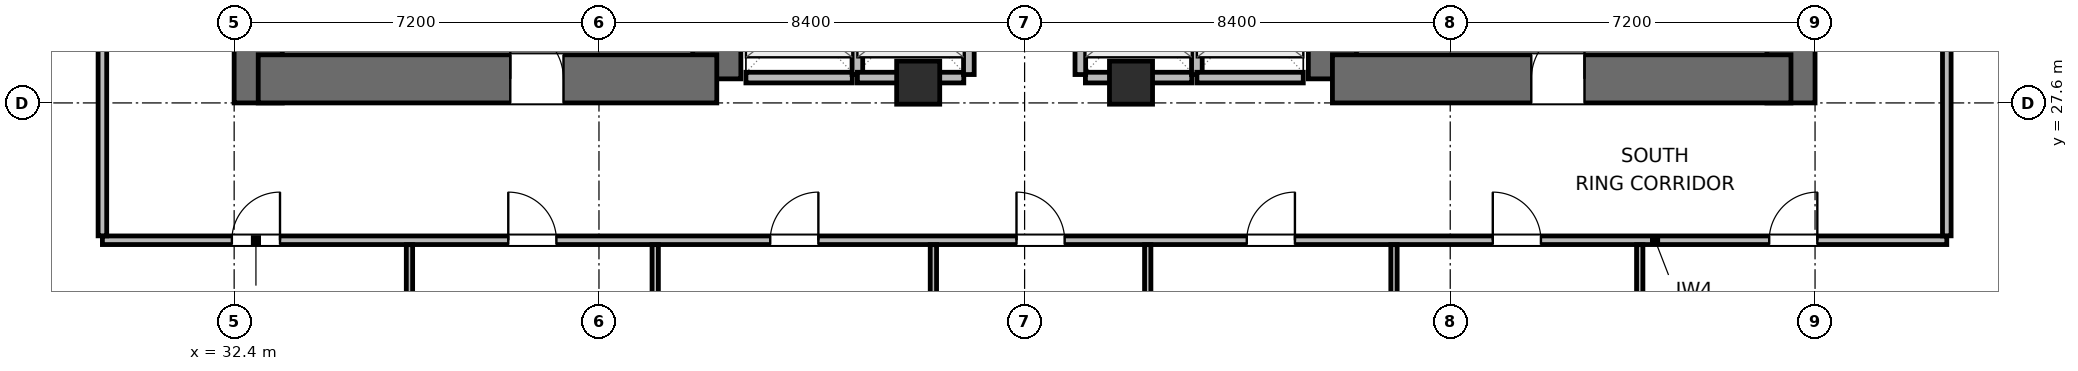
"""IFC4 building model, lengths in metres.
Left out: names, types, materials, properties, quantities, classifications, styles, units other than length and angle.
Written with IfcOpenShell. Run it as: python <this file> out.ifc"""

import sys

from ifc_helpers import new_model, si_unit, direction, frame, frame_2d, origin, origin_2d, place, context, subcontext, project, spatial, rectangle, extrude, element, fill, save


model = new_model("IFC4")
c1 = context("Model", 3, precision=1e-05, world=origin(), true_north=direction((0.0, 1.0)))
c2 = subcontext(c1, "Body", "Model", "MODEL_VIEW")
j1 = project(units=[si_unit("LENGTHUNIT", "METRE"), si_unit("PLANEANGLEUNIT", "RADIAN")], contexts=[c1])
p1 = place(None, origin())
s1 = spatial("IfcSite", under=j1, at=p1, CompositionType="ELEMENT")
p2 = place(p1, origin())
s2 = spatial("IfcBuilding", under=s1, at=p2, CompositionType="ELEMENT")
p3 = place(p2, frame((0.0, 0.0, 48.9)))
s3 = spatial("IfcBuildingStorey", under=s2, at=p3, CompositionType="ELEMENT", Elevation=48.9)
p4 = place(p3, frame((32.875, 27.6, 0.0), z_axis=(0.0, 0.0, 1.0), x_axis=(0.0, 1.0, 0.0)))
e1 = element("IfcWall", 1, at=p4, inside=s3, PredefinedType="SHEAR", context=c2, shape_type="SweptSolid", body=[
    extrude(rectangle(XDim=16.8, YDim=0.95, at=frame_2d((8.4, 0.0))), origin(), (0.0, 0.0, 1.0), 3.9),
])
p5 = place(p3, frame((41.925, 28.075, 0.0), z_axis=(0.0, 0.0, 1.0), x_axis=(0.0, 1.0, 0.0)))
e2 = element("IfcWall", 2, at=p5, inside=s3, PredefinedType="SHEAR", context=c2, shape_type="SweptSolid", body=[
    extrude(rectangle(XDim=6.325, YDim=0.95, at=frame_2d((3.163, 0.0))), origin(), (0.0, 0.0, 1.0), 3.9),
])
p6 = place(p3, frame((32.875, 28.075, 0.0), z_axis=(0.0, 0.0, 1.0), x_axis=(1.0, 0.0, 0.0)))
e3 = element("IfcWall", 3, at=p6, inside=s3, PredefinedType="SHEAR", context=c2, shape_type="SweptSolid", body=[
    extrude(rectangle(XDim=9.05, YDim=0.95, at=frame_2d((4.525, 0.0))), origin(), (0.0, 0.0, 1.0), 3.9),
])
p7 = place(p6, frame((4.975, 0.0, 0.0)))
e4 = element("IfcOpeningElement", 4, at=p7, cuts=e3, PredefinedType="OPENING", context=c2, shape_type="SweptSolid", body=[
    extrude(rectangle(XDim=1.05, YDim=2.04, at=frame_2d((0.525, 1.02))), frame((0.0, 0.485, 0.0), z_axis=(0.0, -1.0, 0.0), x_axis=(1.0, 0.0, 0.0)), (0.0, 0.0, 1.0), 0.97),
])
p8 = place(p3, frame((54.075, 28.075, 0.0), z_axis=(0.0, 0.0, 1.0), x_axis=(0.0, 1.0, 0.0)))
e5 = element("IfcWall", 5, at=p8, inside=s3, PredefinedType="SHEAR", context=c2, shape_type="SweptSolid", body=[
    extrude(rectangle(XDim=7.725, YDim=0.95, at=frame_2d((3.863, 0.0))), origin(), (0.0, 0.0, 1.0), 3.9),
])
p9 = place(p3, frame((63.125, 27.6, 0.0), z_axis=(0.0, 0.0, 1.0), x_axis=(0.0, 1.0, 0.0)))
e6 = element("IfcWall", 6, at=p9, inside=s3, PredefinedType="SHEAR", context=c2, shape_type="SweptSolid", body=[
    extrude(rectangle(XDim=16.8, YDim=0.95, at=frame_2d((8.4, 0.0))), origin(), (0.0, 0.0, 1.0), 3.9),
])
p10 = place(p3, frame((54.075, 28.075, 0.0), z_axis=(0.0, 0.0, 1.0), x_axis=(1.0, 0.0, 0.0)))
e7 = element("IfcWall", 7, at=p10, inside=s3, PredefinedType="SHEAR", context=c2, shape_type="SweptSolid", body=[
    extrude(rectangle(XDim=9.05, YDim=0.95, at=frame_2d((4.525, 0.0))), origin(), (0.0, 0.0, 1.0), 3.9),
])
p11 = place(p10, frame((3.925, 0.0, 0.0)))
e8 = element("IfcOpeningElement", 8, at=p11, cuts=e7, PredefinedType="OPENING", context=c2, shape_type="SweptSolid", body=[
    extrude(rectangle(XDim=1.05, YDim=2.04, at=frame_2d((0.525, 1.02))), frame((0.0, 0.485, 0.0), z_axis=(0.0, -1.0, 0.0), x_axis=(1.0, 0.0, 0.0)), (0.0, 0.0, 1.0), 0.97),
])
for number, where, z_axis, x_axis in (
    (9, (45.9, 28.0, 0.0), (0.0, 0.0, 1.0), (1.0, 0.0, 0.0)),
    (10, (50.1, 28.0, 0.0), (0.0, 0.0, 1.0), (1.0, 0.0, 0.0)),
):
    element("IfcColumn", number, at=place(p3, frame(where, z_axis=z_axis, x_axis=x_axis)), inside=s3, PredefinedType="COLUMN", context=c2, shape_type="SweptSolid", body=[
        extrude(rectangle(XDim=0.85, YDim=0.85, at=origin_2d()), origin(), (0.0, 0.0, 1.0), 3.9),
    ])
p12 = place(p3, frame((42.5, 28.1, 0.0), z_axis=(0.0, 0.0, 1.0), x_axis=(1.0, 0.0, 0.0)))
e11 = element("IfcWall", 11, at=p12, inside=s3, PredefinedType="PARTITIONING", context=c2, shape_type="SweptSolid", body=[
    extrude(rectangle(XDim=2.1, YDim=0.21, at=frame_2d((1.05, 0.0))), origin(), (0.0, 0.0, 1.0), 2.525),
])
p13 = place(p3, frame((44.7, 28.16, 0.0), z_axis=(0.0, 0.0, 1.0), x_axis=(0.0, 1.0, 0.0)))
e12 = element("IfcWall", 12, at=p13, inside=s3, PredefinedType="PARTITIONING", context=c2, shape_type="SweptSolid", body=[
    extrude(rectangle(XDim=2.28, YDim=0.21, at=frame_2d((1.14, 0.0))), origin(), (0.0, 0.0, 1.0), 3.64),
])
p14 = place(p3, frame((44.7, 28.1, 0.0), z_axis=(0.0, 0.0, 1.0), x_axis=(1.0, 0.0, 0.0)))
e13 = element("IfcWall", 13, at=p14, inside=s3, PredefinedType="PARTITIONING", context=c2, shape_type="SweptSolid", body=[
    extrude(rectangle(XDim=2.1, YDim=0.21, at=frame_2d((1.05, 0.0))), origin(), (0.0, 0.0, 1.0), 2.525),
])
p15 = place(p3, frame((46.9, 28.16, 0.0), z_axis=(0.0, 0.0, 1.0), x_axis=(0.0, 1.0, 0.0)))
e14 = element("IfcWall", 14, at=p15, inside=s3, PredefinedType="PARTITIONING", context=c2, shape_type="SweptSolid", body=[
    extrude(rectangle(XDim=2.28, YDim=0.21, at=frame_2d((1.14, 0.0))), origin(), (0.0, 0.0, 1.0), 3.64),
])
p16 = place(p3, frame((49.2, 28.1, 0.0), z_axis=(0.0, 0.0, 1.0), x_axis=(1.0, 0.0, 0.0)))
e15 = element("IfcWall", 15, at=p16, inside=s3, PredefinedType="PARTITIONING", context=c2, shape_type="SweptSolid", body=[
    extrude(rectangle(XDim=2.1, YDim=0.21, at=frame_2d((1.05, 0.0))), origin(), (0.0, 0.0, 1.0), 2.525),
])
for number, where, z_axis, x_axis in (
    (16, (49.1, 28.16, 0.0), (0.0, 0.0, 1.0), (0.0, 1.0, 0.0)),
    (17, (51.4, 28.16, 0.0), (0.0, 0.0, 1.0), (0.0, 1.0, 0.0)),
):
    element("IfcWall", number, at=place(p3, frame(where, z_axis=z_axis, x_axis=x_axis)), inside=s3, PredefinedType="PARTITIONING", context=c2, shape_type="SweptSolid", body=[
        extrude(rectangle(XDim=2.28, YDim=0.21, at=frame_2d((1.14, 0.0))), origin(), (0.0, 0.0, 1.0), 3.64),
    ])
p17 = place(p3, frame((51.4, 28.1, 0.0), z_axis=(0.0, 0.0, 1.0), x_axis=(1.0, 0.0, 0.0)))
e18 = element("IfcWall", 18, at=p17, inside=s3, PredefinedType="PARTITIONING", context=c2, shape_type="SweptSolid", body=[
    extrude(rectangle(XDim=2.1, YDim=0.21, at=frame_2d((1.05, 0.0))), origin(), (0.0, 0.0, 1.0), 2.525),
])
p18 = place(p3, frame((29.8, 24.89, 0.0), z_axis=(0.0, 0.0, 1.0), x_axis=(1.0, 0.0, 0.0)))
e19 = element("IfcWall", 19, at=p18, inside=s3, PredefinedType="PARTITIONING", context=c2, shape_type="SweptSolid", body=[
    extrude(rectangle(XDim=36.4, YDim=0.17, at=frame_2d((18.2, 0.0))), origin(), (0.0, 0.0, 1.0), 3.64),
])
p19 = place(p18, frame((2.555, 0.0, 0.0)))
e20 = element("IfcOpeningElement", 20, at=p19, cuts=e19, PredefinedType="OPENING", context=c2, shape_type="SweptSolid", body=[
    extrude(rectangle(XDim=0.95, YDim=2.04, at=frame_2d((0.475, 1.02))), frame((0.0, 0.095, 0.0), z_axis=(0.0, -1.0, 0.0), x_axis=(1.0, 0.0, 0.0)), (0.0, 0.0, 1.0), 0.19),
])
p20 = place(p18, frame((8.01, 0.0, 0.0)))
e21 = element("IfcOpeningElement", 21, at=p20, cuts=e19, PredefinedType="OPENING", context=c2, shape_type="SweptSolid", body=[
    extrude(rectangle(XDim=0.95, YDim=2.04, at=frame_2d((0.475, 1.02))), frame((0.0, 0.095, 0.0), z_axis=(0.0, -1.0, 0.0), x_axis=(1.0, 0.0, 0.0)), (0.0, 0.0, 1.0), 0.19),
])
p21 = place(p18, frame((13.18, 0.0, 0.0)))
e22 = element("IfcOpeningElement", 22, at=p21, cuts=e19, PredefinedType="OPENING", context=c2, shape_type="SweptSolid", body=[
    extrude(rectangle(XDim=0.95, YDim=2.04, at=frame_2d((0.475, 1.02))), frame((0.0, 0.095, 0.0), z_axis=(0.0, -1.0, 0.0), x_axis=(1.0, 0.0, 0.0)), (0.0, 0.0, 1.0), 0.19),
])
p22 = place(p18, frame((18.04, 0.0, 0.0)))
e23 = element("IfcOpeningElement", 23, at=p22, cuts=e19, PredefinedType="OPENING", context=c2, shape_type="SweptSolid", body=[
    extrude(rectangle(XDim=0.95, YDim=2.04, at=frame_2d((0.475, 1.02))), frame((0.0, 0.095, 0.0), z_axis=(0.0, -1.0, 0.0), x_axis=(1.0, 0.0, 0.0)), (0.0, 0.0, 1.0), 0.19),
])
p23 = place(p18, frame((22.585, 0.0, 0.0)))
e24 = element("IfcOpeningElement", 24, at=p23, cuts=e19, PredefinedType="OPENING", context=c2, shape_type="SweptSolid", body=[
    extrude(rectangle(XDim=0.95, YDim=2.04, at=frame_2d((0.475, 1.02))), frame((0.0, 0.095, 0.0), z_axis=(0.0, -1.0, 0.0), x_axis=(1.0, 0.0, 0.0)), (0.0, 0.0, 1.0), 0.19),
])
p24 = place(p18, frame((27.44, 0.0, 0.0)))
e25 = element("IfcOpeningElement", 25, at=p24, cuts=e19, PredefinedType="OPENING", context=c2, shape_type="SweptSolid", body=[
    extrude(rectangle(XDim=0.95, YDim=2.04, at=frame_2d((0.475, 1.02))), frame((0.0, 0.095, 0.0), z_axis=(0.0, -1.0, 0.0), x_axis=(1.0, 0.0, 0.0)), (0.0, 0.0, 1.0), 0.19),
])
p25 = place(p18, frame((32.895, 0.0, 0.0)))
e26 = element("IfcOpeningElement", 26, at=p25, cuts=e19, PredefinedType="OPENING", context=c2, shape_type="SweptSolid", body=[
    extrude(rectangle(XDim=0.95, YDim=2.04, at=frame_2d((0.475, 1.02))), frame((0.0, 0.095, 0.0), z_axis=(0.0, -1.0, 0.0), x_axis=(1.0, 0.0, 0.0)), (0.0, 0.0, 1.0), 0.19),
])
p26 = place(p3, frame((29.8, 24.977, 0.0), z_axis=(0.0, 0.0, 1.0), x_axis=(0.0, 1.0, 0.0)))
e27 = element("IfcWall", 27, at=p26, inside=s3, PredefinedType="PARTITIONING", context=c2, shape_type="SweptSolid", body=[
    extrude(rectangle(XDim=22.046, YDim=0.17, at=frame_2d((11.023, 0.0))), origin(), (0.0, 0.0, 1.0), 3.64),
])
p27 = place(p26, frame((10.548, 0.0, 0.0)))
e28 = element("IfcOpeningElement", 28, at=p27, cuts=e27, PredefinedType="OPENING", context=c2, shape_type="SweptSolid", body=[
    extrude(rectangle(XDim=0.95, YDim=2.04, at=frame_2d((0.475, 1.02))), frame((0.0, 0.095, 0.0), z_axis=(0.0, -1.0, 0.0), x_axis=(1.0, 0.0, 0.0)), (0.0, 0.0, 1.0), 0.19),
])
p28 = place(p3, frame((66.2, 24.977, 0.0), z_axis=(0.0, 0.0, 1.0), x_axis=(0.0, 1.0, 0.0)))
e29 = element("IfcWall", 29, at=p28, inside=s3, PredefinedType="PARTITIONING", context=c2, shape_type="SweptSolid", body=[
    extrude(rectangle(XDim=22.046, YDim=0.17, at=frame_2d((11.023, 0.0))), origin(), (0.0, 0.0, 1.0), 3.64),
])
p29 = place(p28, frame((4.493, 0.0, 0.0)))
e30 = element("IfcOpeningElement", 30, at=p29, cuts=e29, PredefinedType="OPENING", context=c2, shape_type="SweptSolid", body=[
    extrude(rectangle(XDim=0.95, YDim=2.04, at=frame_2d((0.475, 1.02))), frame((0.0, 0.095, 0.0), z_axis=(0.0, -1.0, 0.0), x_axis=(1.0, 0.0, 0.0)), (0.0, 0.0, 1.0), 0.19),
])
p30 = place(p28, frame((15.603, 0.0, 0.0)))
e31 = element("IfcOpeningElement", 31, at=p30, cuts=e29, PredefinedType="OPENING", context=c2, shape_type="SweptSolid", body=[
    extrude(rectangle(XDim=0.95, YDim=2.04, at=frame_2d((0.475, 1.02))), frame((0.0, 0.095, 0.0), z_axis=(0.0, -1.0, 0.0), x_axis=(1.0, 0.0, 0.0)), (0.0, 0.0, 1.0), 0.19),
])
p31 = place(p3, frame((35.86, 9.915, 0.0), z_axis=(0.0, 0.0, 1.0), x_axis=(0.0, 1.0, 0.0)))
e32 = element("IfcWall", 32, at=p31, inside=s3, PredefinedType="PARTITIONING", context=c2, shape_type="SweptSolid", body=[
    extrude(rectangle(XDim=14.888, YDim=0.125, at=frame_2d((7.444, 0.0))), origin(), (0.0, 0.0, 1.0), 3.64),
])
p32 = place(p3, frame((40.71, 9.915, 0.0), z_axis=(0.0, 0.0, 1.0), x_axis=(0.0, 1.0, 0.0)))
e33 = element("IfcWall", 33, at=p32, inside=s3, PredefinedType="PARTITIONING", context=c2, shape_type="SweptSolid", body=[
    extrude(rectangle(XDim=14.888, YDim=0.125, at=frame_2d((7.444, 0.0))), origin(), (0.0, 0.0, 1.0), 3.003),
])
p33 = place(p3, frame((46.2, 13.575, 0.0), z_axis=(0.0, 0.0, 1.0), x_axis=(0.0, 1.0, 0.0)))
e34 = element("IfcWall", 34, at=p33, inside=s3, PredefinedType="PARTITIONING", context=c2, shape_type="SweptSolid", body=[
    extrude(rectangle(XDim=11.228, YDim=0.125, at=frame_2d((5.614, 0.0))), origin(), (0.0, 0.0, 1.0), 3.64),
])
p34 = place(p3, frame((50.43, 11.515, 0.0), z_axis=(0.0, 0.0, 1.0), x_axis=(0.0, 1.0, 0.0)))
e35 = element("IfcWall", 35, at=p34, inside=s3, PredefinedType="PARTITIONING", context=c2, shape_type="SweptSolid", body=[
    extrude(rectangle(XDim=13.288, YDim=0.125, at=frame_2d((6.644, 0.0))), origin(), (0.0, 0.0, 1.0), 3.64),
])
p35 = place(p3, frame((55.29, 9.915, 0.0), z_axis=(0.0, 0.0, 1.0), x_axis=(0.0, 1.0, 0.0)))
e36 = element("IfcWall", 36, at=p35, inside=s3, PredefinedType="PARTITIONING", context=c2, shape_type="SweptSolid", body=[
    extrude(rectangle(XDim=14.888, YDim=0.125, at=frame_2d((7.444, 0.0))), origin(), (0.0, 0.0, 1.0), 3.003),
])
p36 = place(p3, frame((60.14, 9.915, 0.0), z_axis=(0.0, 0.0, 1.0), x_axis=(0.0, 1.0, 0.0)))
e37 = element("IfcWall", 37, at=p36, inside=s3, PredefinedType="PARTITIONING", context=c2, shape_type="SweptSolid", body=[
    extrude(rectangle(XDim=14.888, YDim=0.125, at=frame_2d((7.444, 0.0))), origin(), (0.0, 0.0, 1.0), 3.64),
])
p37 = place(p7, origin())
e38 = element("IfcDoor", 38, at=p37, inside=s3, OperationType="SINGLE_SWING_LEFT", PredefinedType="DOOR", context=c2, shape_type="SweptSolid", body=[
    extrude(rectangle(XDim=1.05, YDim=2.04, at=frame_2d((0.525, 1.02))), frame((0.0, 0.025, 0.0), z_axis=(0.0, -1.0, 0.0), x_axis=(1.0, 0.0, 0.0)), (0.0, 0.0, 1.0), 0.05),
])
fill(e4, e38)
p38 = place(p11, origin())
e39 = element("IfcDoor", 39, at=p38, inside=s3, OperationType="SINGLE_SWING_RIGHT", PredefinedType="DOOR", context=c2, shape_type="SweptSolid", body=[
    extrude(rectangle(XDim=1.05, YDim=2.04, at=frame_2d((0.525, 1.02))), frame((0.0, 0.025, 0.0), z_axis=(0.0, -1.0, 0.0), x_axis=(1.0, 0.0, 0.0)), (0.0, 0.0, 1.0), 0.05),
])
fill(e8, e39)
p39 = place(p19, origin())
e40 = element("IfcDoor", 40, at=p39, inside=s3, OperationType="SINGLE_SWING_RIGHT", PredefinedType="DOOR", context=c2, shape_type="SweptSolid", body=[
    extrude(rectangle(XDim=0.95, YDim=2.04, at=frame_2d((0.475, 1.02))), frame((0.0, 0.025, 0.0), z_axis=(0.0, -1.0, 0.0), x_axis=(1.0, 0.0, 0.0)), (0.0, 0.0, 1.0), 0.05),
])
fill(e20, e40)
p40 = place(p20, origin())
e41 = element("IfcDoor", 41, at=p40, inside=s3, OperationType="SINGLE_SWING_LEFT", PredefinedType="DOOR", context=c2, shape_type="SweptSolid", body=[
    extrude(rectangle(XDim=0.95, YDim=2.04, at=frame_2d((0.475, 1.02))), frame((0.0, 0.025, 0.0), z_axis=(0.0, -1.0, 0.0), x_axis=(1.0, 0.0, 0.0)), (0.0, 0.0, 1.0), 0.05),
])
fill(e21, e41)
p41 = place(p21, origin())
e42 = element("IfcDoor", 42, at=p41, inside=s3, OperationType="SINGLE_SWING_RIGHT", PredefinedType="DOOR", context=c2, shape_type="SweptSolid", body=[
    extrude(rectangle(XDim=0.95, YDim=2.04, at=frame_2d((0.475, 1.02))), frame((0.0, 0.025, 0.0), z_axis=(0.0, -1.0, 0.0), x_axis=(1.0, 0.0, 0.0)), (0.0, 0.0, 1.0), 0.05),
])
fill(e22, e42)
p42 = place(p22, origin())
e43 = element("IfcDoor", 43, at=p42, inside=s3, OperationType="SINGLE_SWING_LEFT", PredefinedType="DOOR", context=c2, shape_type="SweptSolid", body=[
    extrude(rectangle(XDim=0.95, YDim=2.04, at=frame_2d((0.475, 1.02))), frame((0.0, 0.025, 0.0), z_axis=(0.0, -1.0, 0.0), x_axis=(1.0, 0.0, 0.0)), (0.0, 0.0, 1.0), 0.05),
])
fill(e23, e43)
p43 = place(p23, origin())
e44 = element("IfcDoor", 44, at=p43, inside=s3, OperationType="SINGLE_SWING_RIGHT", PredefinedType="DOOR", context=c2, shape_type="SweptSolid", body=[
    extrude(rectangle(XDim=0.95, YDim=2.04, at=frame_2d((0.475, 1.02))), frame((0.0, 0.025, 0.0), z_axis=(0.0, -1.0, 0.0), x_axis=(1.0, 0.0, 0.0)), (0.0, 0.0, 1.0), 0.05),
])
fill(e24, e44)
p44 = place(p24, origin())
e45 = element("IfcDoor", 45, at=p44, inside=s3, OperationType="SINGLE_SWING_LEFT", PredefinedType="DOOR", context=c2, shape_type="SweptSolid", body=[
    extrude(rectangle(XDim=0.95, YDim=2.04, at=frame_2d((0.475, 1.02))), frame((0.0, 0.025, 0.0), z_axis=(0.0, -1.0, 0.0), x_axis=(1.0, 0.0, 0.0)), (0.0, 0.0, 1.0), 0.05),
])
fill(e25, e45)
p45 = place(p25, origin())
e46 = element("IfcDoor", 46, at=p45, inside=s3, OperationType="SINGLE_SWING_RIGHT", PredefinedType="DOOR", context=c2, shape_type="SweptSolid", body=[
    extrude(rectangle(XDim=0.95, YDim=2.04, at=frame_2d((0.475, 1.02))), frame((0.0, 0.025, 0.0), z_axis=(0.0, -1.0, 0.0), x_axis=(1.0, 0.0, 0.0)), (0.0, 0.0, 1.0), 0.05),
])
fill(e26, e46)
save(model, sys.argv[1])
